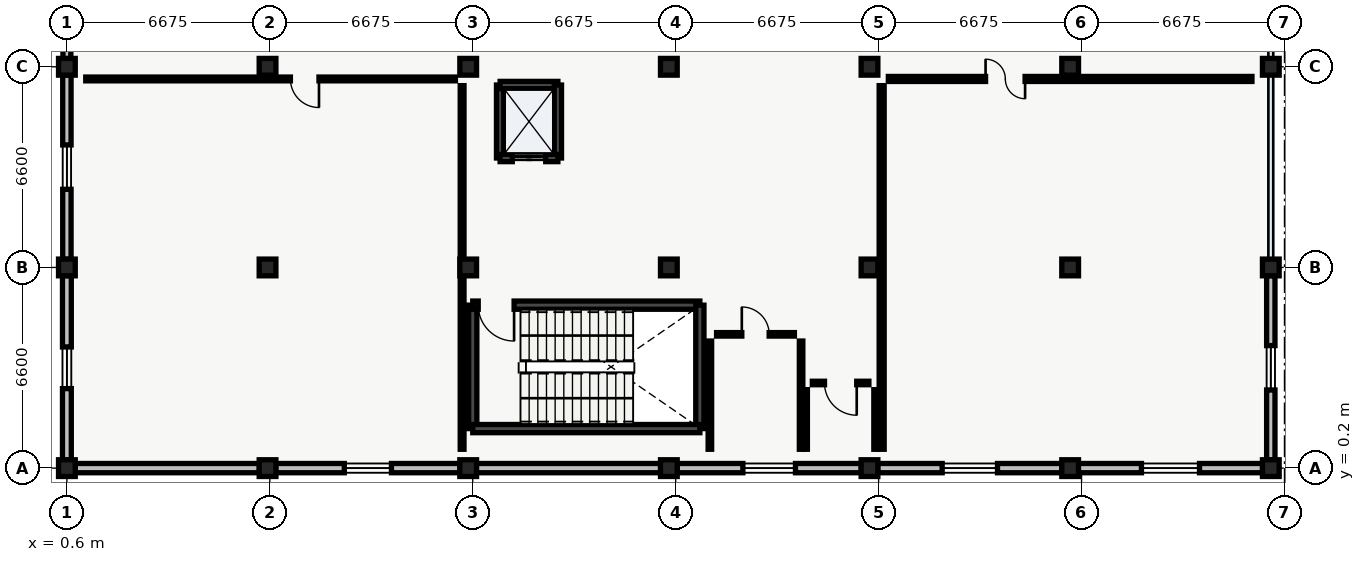
"""IFC4 building model, lengths in metres.
Left out: names, types, materials, properties, quantities, classifications, styles, units other than length and angle.
Written with IfcOpenShell. Run it as: python <this file> out.ifc"""

import sys

from ifc_helpers import new_model, si_unit, direction, frame, frame_2d, origin, origin_2d, place, context, subcontext, project, spatial, rectangle, extrude, element, fill, save


model = new_model("IFC4")
c1 = context("Model", 3, precision=1e-05, world=origin(), true_north=direction((0.0, 1.0)))
c2 = subcontext(c1, "Body", "Model", "MODEL_VIEW")
j1 = project(units=[si_unit("LENGTHUNIT", "METRE"), si_unit("PLANEANGLEUNIT", "RADIAN")], contexts=[c1])
p1 = place(None, origin())
s1 = spatial("IfcSite", under=j1, at=p1, CompositionType="ELEMENT")
p2 = place(p1, origin())
s2 = spatial("IfcBuilding", under=s1, at=p2, CompositionType="ELEMENT")
p3 = place(p2, frame((0.0, 0.0, 14.1)))
s3 = spatial("IfcBuildingStorey", under=s2, at=p3, CompositionType="ELEMENT", Elevation=14.1)
for number, where, z_axis, x_axis in (
    (1, (0.6, 0.2, 0.0), (0.0, 0.0, 1.0), (1.0, 0.0, 0.0)),
    (2, (0.6, 6.8, 0.0), (0.0, 0.0, 1.0), (1.0, 0.0, 0.0)),
    (3, (0.6, 13.4, 0.0), (0.0, 0.0, 1.0), (1.0, 0.0, 0.0)),
    (4, (7.2, 0.2, 0.0), (0.0, 0.0, 1.0), (1.0, 0.0, 0.0)),
    (5, (7.2, 6.8, 0.0), (0.0, 0.0, 1.0), (1.0, 0.0, 0.0)),
    (6, (7.2, 13.4, 0.0), (0.0, 0.0, 1.0), (1.0, 0.0, 0.0)),
    (7, (13.8, 0.2, 0.0), (0.0, 0.0, 1.0), (1.0, 0.0, 0.0)),
    (8, (13.8, 6.8, 0.0), (0.0, 0.0, 1.0), (1.0, 0.0, 0.0)),
    (9, (13.8, 13.4, 0.0), (0.0, 0.0, 1.0), (1.0, 0.0, 0.0)),
    (10, (20.4, 0.2, 0.0), (0.0, 0.0, 1.0), (1.0, 0.0, 0.0)),
    (11, (20.4, 6.8, 0.0), (0.0, 0.0, 1.0), (1.0, 0.0, 0.0)),
    (12, (20.4, 13.4, 0.0), (0.0, 0.0, 1.0), (1.0, 0.0, 0.0)),
    (13, (27.0, 0.2, 0.0), (0.0, 0.0, 1.0), (1.0, 0.0, 0.0)),
    (14, (27.0, 6.8, 0.0), (0.0, 0.0, 1.0), (1.0, 0.0, 0.0)),
    (15, (27.0, 13.4, 0.0), (0.0, 0.0, 1.0), (1.0, 0.0, 0.0)),
    (16, (33.6, 0.2, 0.0), (0.0, 0.0, 1.0), (1.0, 0.0, 0.0)),
    (17, (33.6, 6.8, 0.0), (0.0, 0.0, 1.0), (1.0, 0.0, 0.0)),
    (18, (33.6, 13.4, 0.0), (0.0, 0.0, 1.0), (1.0, 0.0, 0.0)),
    (19, (40.2, 0.2, 0.0), (0.0, 0.0, 1.0), (1.0, 0.0, 0.0)),
    (20, (40.2, 6.8, 0.0), (0.0, 0.0, 1.0), (1.0, 0.0, 0.0)),
    (21, (40.2, 13.4, 0.0), (0.0, 0.0, 1.0), (1.0, 0.0, 0.0)),
):
    element("IfcColumn", number, at=place(p3, frame(where, z_axis=z_axis, x_axis=x_axis)), inside=s3, PredefinedType="COLUMN", context=c2, shape_type="SweptSolid", body=[
        extrude(rectangle(XDim=0.55, YDim=0.55, at=origin_2d()), origin(), (0.0, 0.0, 1.0), 4.3),
    ])
p4 = place(p3, frame((0.6, 0.47, 0.0), z_axis=(0.0, 0.0, 1.0), x_axis=(0.0, 1.0, 0.0)))
e22 = element("IfcWall", 22, at=p4, inside=s3, PredefinedType="STANDARD", context=c2, shape_type="SweptSolid", body=[
    extrude(rectangle(XDim=6.06, YDim=0.29, at=frame_2d((3.03, 0.0))), origin(), (0.0, 0.0, 1.0), 3.785),
])
p5 = place(p4, frame((2.345, 0.0, 0.95)))
e23 = element("IfcOpeningElement", 23, at=p5, cuts=e22, PredefinedType="OPENING", context=c2, shape_type="SweptSolid", body=[
    extrude(rectangle(XDim=1.37, YDim=1.42, at=frame_2d((0.685, 0.71))), frame((0.0, 0.145, 0.0), z_axis=(0.0, -1.0, 0.0), x_axis=(1.0, 0.0, 0.0)), (0.0, 0.0, 1.0), 0.29),
])
p6 = place(p3, frame((0.6, 7.07, 0.0), z_axis=(0.0, 0.0, 1.0), x_axis=(0.0, 1.0, 0.0)))
e24 = element("IfcWall", 24, at=p6, inside=s3, PredefinedType="STANDARD", context=c2, shape_type="SweptSolid", body=[
    extrude(rectangle(XDim=6.06, YDim=0.275, at=frame_2d((3.03, 0.0))), origin(), (0.0, 0.0, 1.0), 3.785),
])
p7 = place(p6, frame((2.3, 0.0, 0.95)))
e25 = element("IfcOpeningElement", 25, at=p7, cuts=e24, PredefinedType="OPENING", context=c2, shape_type="SweptSolid", body=[
    extrude(rectangle(XDim=1.46, YDim=1.44, at=frame_2d((0.73, 0.72))), frame((0.0, 0.137, 0.0), z_axis=(0.0, -1.0, 0.0), x_axis=(1.0, 0.0, 0.0)), (0.0, 0.0, 1.0), 0.275),
])
p8 = place(p3, frame((0.6, 13.67, 0.0), z_axis=(0.0, 0.0, 1.0), x_axis=(0.0, 1.0, 0.0)))
e26 = element("IfcWall", 26, at=p8, inside=s3, PredefinedType="STANDARD", context=c2, shape_type="SweptSolid", body=[
    extrude(rectangle(XDim=6.06, YDim=0.26, at=frame_2d((3.03, 0.0))), origin(), (0.0, 0.0, 1.0), 3.785),
])
p9 = place(p8, frame((2.255, 0.0, 0.95)))
e27 = element("IfcOpeningElement", 27, at=p9, cuts=e26, PredefinedType="OPENING", context=c2, shape_type="SweptSolid", body=[
    extrude(rectangle(XDim=1.55, YDim=1.46, at=frame_2d((0.775, 0.73))), frame((0.0, 0.13, 0.0), z_axis=(0.0, -1.0, 0.0), x_axis=(1.0, 0.0, 0.0)), (0.0, 0.0, 1.0), 0.26),
])
p10 = place(p3, frame((40.2, 6.53, 0.0), z_axis=(0.0, 0.0, 1.0), x_axis=(0.0, -1.0, 0.0)))
e28 = element("IfcWall", 28, at=p10, inside=s3, PredefinedType="STANDARD", context=c2, shape_type="SweptSolid", body=[
    extrude(rectangle(XDim=6.06, YDim=0.275, at=frame_2d((3.03, 0.0))), origin(), (0.0, 0.0, 1.0), 3.785),
])
p11 = place(p10, frame((2.3, 0.0, 0.95)))
e29 = element("IfcOpeningElement", 29, at=p11, cuts=e28, PredefinedType="OPENING", context=c2, shape_type="SweptSolid", body=[
    extrude(rectangle(XDim=1.46, YDim=1.44, at=frame_2d((0.73, 0.72))), frame((0.0, 0.137, 0.0), z_axis=(0.0, -1.0, 0.0), x_axis=(1.0, 0.0, 0.0)), (0.0, 0.0, 1.0), 0.275),
])
p12 = place(p3, frame((39.93, 0.2, 0.0), z_axis=(0.0, 0.0, 1.0), x_axis=(-1.0, 0.0, 0.0)))
e30 = element("IfcWall", 30, at=p12, inside=s3, PredefinedType="STANDARD", context=c2, shape_type="SweptSolid", body=[
    extrude(rectangle(XDim=6.06, YDim=0.305, at=frame_2d((3.03, 0.0))), origin(), (0.0, 0.0, 1.0), 3.785),
])
p13 = place(p12, frame((2.075, 0.0, 0.95)))
e31 = element("IfcOpeningElement", 31, at=p13, cuts=e30, PredefinedType="OPENING", context=c2, shape_type="SweptSolid", body=[
    extrude(rectangle(XDim=1.91, YDim=1.4, at=frame_2d((0.955, 0.7))), frame((0.0, 0.152, 0.0), z_axis=(0.0, -1.0, 0.0), x_axis=(1.0, 0.0, 0.0)), (0.0, 0.0, 1.0), 0.305),
])
p14 = place(p3, frame((33.33, 0.2, 0.0), z_axis=(0.0, 0.0, 1.0), x_axis=(-1.0, 0.0, 0.0)))
e32 = element("IfcWall", 32, at=p14, inside=s3, PredefinedType="STANDARD", context=c2, shape_type="SweptSolid", body=[
    extrude(rectangle(XDim=6.06, YDim=0.305, at=frame_2d((3.03, 0.0))), origin(), (0.0, 0.0, 1.0), 3.785),
])
p15 = place(p14, frame((2.12, 0.0, 0.95)))
e33 = element("IfcOpeningElement", 33, at=p15, cuts=e32, PredefinedType="OPENING", context=c2, shape_type="SweptSolid", body=[
    extrude(rectangle(XDim=1.82, YDim=1.38, at=frame_2d((0.91, 0.69))), frame((0.0, 0.152, 0.0), z_axis=(0.0, -1.0, 0.0), x_axis=(1.0, 0.0, 0.0)), (0.0, 0.0, 1.0), 0.305),
])
p16 = place(p3, frame((26.73, 0.2, 0.0), z_axis=(0.0, 0.0, 1.0), x_axis=(-1.0, 0.0, 0.0)))
e34 = element("IfcWall", 34, at=p16, inside=s3, PredefinedType="STANDARD", context=c2, shape_type="SweptSolid", body=[
    extrude(rectangle(XDim=6.06, YDim=0.305, at=frame_2d((3.03, 0.0))), origin(), (0.0, 0.0, 1.0), 3.785),
])
p17 = place(p16, frame((2.165, 0.0, 0.95)))
e35 = element("IfcOpeningElement", 35, at=p17, cuts=e34, PredefinedType="OPENING", context=c2, shape_type="SweptSolid", body=[
    extrude(rectangle(XDim=1.73, YDim=1.36, at=frame_2d((0.865, 0.68))), frame((0.0, 0.152, 0.0), z_axis=(0.0, -1.0, 0.0), x_axis=(1.0, 0.0, 0.0)), (0.0, 0.0, 1.0), 0.305),
])
p18 = place(p3, frame((20.13, 0.2, 0.0), z_axis=(0.0, 0.0, 1.0), x_axis=(-1.0, 0.0, 0.0)))
e36 = element("IfcWall", 36, at=p18, inside=s3, PredefinedType="STANDARD", context=c2, shape_type="SweptSolid", body=[
    extrude(rectangle(XDim=6.06, YDim=0.305, at=frame_2d((3.03, 0.0))), origin(), (0.0, 0.0, 1.0), 3.785),
])
p19 = place(p3, frame((13.53, 0.2, 0.0), z_axis=(0.0, 0.0, 1.0), x_axis=(-1.0, 0.0, 0.0)))
e37 = element("IfcWall", 37, at=p19, inside=s3, PredefinedType="STANDARD", context=c2, shape_type="SweptSolid", body=[
    extrude(rectangle(XDim=6.06, YDim=0.305, at=frame_2d((3.03, 0.0))), origin(), (0.0, 0.0, 1.0), 3.785),
])
p20 = place(p19, frame((2.255, 0.0, 0.95)))
e38 = element("IfcOpeningElement", 38, at=p20, cuts=e37, PredefinedType="OPENING", context=c2, shape_type="SweptSolid", body=[
    extrude(rectangle(XDim=1.55, YDim=1.46, at=frame_2d((0.775, 0.73))), frame((0.0, 0.152, 0.0), z_axis=(0.0, -1.0, 0.0), x_axis=(1.0, 0.0, 0.0)), (0.0, 0.0, 1.0), 0.305),
])
p21 = place(p3, frame((6.93, 0.2, 0.0), z_axis=(0.0, 0.0, 1.0), x_axis=(-1.0, 0.0, 0.0)))
e39 = element("IfcWall", 39, at=p21, inside=s3, PredefinedType="STANDARD", context=c2, shape_type="SweptSolid", body=[
    extrude(rectangle(XDim=6.06, YDim=0.305, at=frame_2d((3.03, 0.0))), origin(), (0.0, 0.0, 1.0), 3.785),
])
p22 = place(p3, frame((13.95, 1.5, 0.0), z_axis=(0.0, 0.0, 1.0), x_axis=(0.0, 1.0, 0.0)))
e40 = element("IfcWall", 40, at=p22, inside=s3, PredefinedType="SHEAR", context=c2, shape_type="SweptSolid", body=[
    extrude(rectangle(XDim=4.06, YDim=0.27, at=frame_2d((2.03, 0.0))), origin(), (0.0, 0.0, 1.0), 4.28),
])
p23 = place(p3, frame((13.95, 5.56, 0.0), z_axis=(0.0, 0.0, 1.0), x_axis=(1.0, 0.0, 0.0)))
e41 = element("IfcWall", 41, at=p23, inside=s3, PredefinedType="SHEAR", context=c2, shape_type="SweptSolid", body=[
    extrude(rectangle(XDim=7.47, YDim=0.27, at=frame_2d((3.735, 0.0))), origin(), (0.0, 0.0, 1.0), 4.28),
])
p24 = place(p23, frame((0.18, 0.0, 0.0)))
e42 = element("IfcOpeningElement", 42, at=p24, cuts=e41, PredefinedType="OPENING", context=c2, shape_type="SweptSolid", body=[
    extrude(rectangle(XDim=1.18, YDim=2.15, at=frame_2d((0.59, 1.075))), frame((0.0, 0.135, 0.0), z_axis=(0.0, -1.0, 0.0), x_axis=(1.0, 0.0, 0.0)), (0.0, 0.0, 1.0), 0.27),
])
p25 = place(p3, frame((21.42, 5.56, 0.0), z_axis=(0.0, 0.0, 1.0), x_axis=(0.0, -1.0, 0.0)))
e43 = element("IfcWall", 43, at=p25, inside=s3, PredefinedType="SHEAR", context=c2, shape_type="SweptSolid", body=[
    extrude(rectangle(XDim=4.06, YDim=0.27, at=frame_2d((2.03, 0.0))), origin(), (0.0, 0.0, 1.0), 4.28),
])
p26 = place(p3, frame((21.42, 1.5, 0.0), z_axis=(0.0, 0.0, 1.0), x_axis=(-1.0, 0.0, 0.0)))
e44 = element("IfcWall", 44, at=p26, inside=s3, PredefinedType="SHEAR", context=c2, shape_type="SweptSolid", body=[
    extrude(rectangle(XDim=7.47, YDim=0.27, at=frame_2d((3.735, 0.0))), origin(), (0.0, 0.0, 1.0), 4.28),
])
p27 = place(p3, frame((14.85, 10.4, 0.0), z_axis=(0.0, 0.0, 1.0), x_axis=(0.0, 1.0, 0.0)))
e45 = element("IfcWall", 45, at=p27, inside=s3, PredefinedType="SHEAR", context=c2, shape_type="SweptSolid", body=[
    extrude(rectangle(XDim=2.4, YDim=0.24, at=frame_2d((1.2, 0.0))), origin(), (0.0, 0.0, 1.0), 4.28),
])
p28 = place(p3, frame((14.85, 12.8, 0.0), z_axis=(0.0, 0.0, 1.0), x_axis=(1.0, 0.0, 0.0)))
e46 = element("IfcWall", 46, at=p28, inside=s3, PredefinedType="SHEAR", context=c2, shape_type="SweptSolid", body=[
    extrude(rectangle(XDim=1.9, YDim=0.24, at=frame_2d((0.95, 0.0))), origin(), (0.0, 0.0, 1.0), 4.28),
])
p29 = place(p3, frame((16.75, 12.8, 0.0), z_axis=(0.0, 0.0, 1.0), x_axis=(0.0, -1.0, 0.0)))
e47 = element("IfcWall", 47, at=p29, inside=s3, PredefinedType="SHEAR", context=c2, shape_type="SweptSolid", body=[
    extrude(rectangle(XDim=2.4, YDim=0.24, at=frame_2d((1.2, 0.0))), origin(), (0.0, 0.0, 1.0), 4.28),
])
p30 = place(p3, frame((16.75, 10.4, 0.0), z_axis=(0.0, 0.0, 1.0), x_axis=(-1.0, 0.0, 0.0)))
e48 = element("IfcWall", 48, at=p30, inside=s3, PredefinedType="SHEAR", context=c2, shape_type="SweptSolid", body=[
    extrude(rectangle(XDim=1.9, YDim=0.24, at=frame_2d((0.95, 0.0))), origin(), (0.0, 0.0, 1.0), 4.28),
])
p31 = place(p30, frame((0.4, 0.0, 0.0)))
e49 = element("IfcOpeningElement", 49, at=p31, cuts=e48, PredefinedType="OPENING", context=c2, shape_type="SweptSolid", body=[
    extrude(rectangle(XDim=1.1, YDim=2.2, at=frame_2d((0.55, 1.1))), frame((0.0, 0.12, 0.0), z_axis=(0.0, -1.0, 0.0), x_axis=(1.0, 0.0, 0.0)), (0.0, 0.0, 1.0), 0.24),
])
p32 = place(p3, frame((24.75, 0.82, 0.0), z_axis=(0.0, 0.0, 1.0), x_axis=(0.0, 1.0, 0.0)))
e50 = element("IfcWall", 50, at=p32, inside=s3, PredefinedType="PARTITIONING", context=c2, shape_type="SweptSolid", body=[
    extrude(rectangle(XDim=3.56, YDim=0.115, at=frame_2d((1.78, 0.0))), origin(), (0.0, 0.0, 1.0), 3.95),
])
p33 = place(p3, frame((24.53, 4.6, 0.0), z_axis=(0.0, 0.0, 1.0), x_axis=(-1.0, 0.0, 0.0)))
e51 = element("IfcWall", 51, at=p33, inside=s3, PredefinedType="PARTITIONING", context=c2, shape_type="SweptSolid", body=[
    extrude(rectangle(XDim=2.56, YDim=0.115, at=frame_2d((1.28, 0.0))), origin(), (0.0, 0.0, 1.0), 3.95),
])
p34 = place(p33, frame((0.83, 0.0, 0.0)))
e52 = element("IfcOpeningElement", 52, at=p34, cuts=e51, PredefinedType="OPENING", context=c2, shape_type="SweptSolid", body=[
    extrude(rectangle(XDim=0.9, YDim=2.1, at=frame_2d((0.45, 1.05))), frame((0.0, 0.058, 0.0), z_axis=(0.0, -1.0, 0.0), x_axis=(1.0, 0.0, 0.0)), (0.0, 0.0, 1.0), 0.115),
])
p35 = place(p3, frame((21.75, 4.38, 0.0), z_axis=(0.0, 0.0, 1.0), x_axis=(0.0, -1.0, 0.0)))
e53 = element("IfcWall", 53, at=p35, inside=s3, PredefinedType="PARTITIONING", context=c2, shape_type="SweptSolid", body=[
    extrude(rectangle(XDim=3.56, YDim=0.115, at=frame_2d((1.78, 0.0))), origin(), (0.0, 0.0, 1.0), 3.95),
])
p36 = place(p3, frame((27.2, 0.82, 0.0), z_axis=(0.0, 0.0, 1.0), x_axis=(0.0, 1.0, 0.0)))
e54 = element("IfcWall", 54, at=p36, inside=s3, PredefinedType="PARTITIONING", context=c2, shape_type="SweptSolid", body=[
    extrude(rectangle(XDim=1.96, YDim=0.115, at=frame_2d((0.98, 0.0))), origin(), (0.0, 0.0, 1.0), 3.685),
])
p37 = place(p3, frame((26.98, 3.0, 0.0), z_axis=(0.0, 0.0, 1.0), x_axis=(-1.0, 0.0, 0.0)))
e55 = element("IfcWall", 55, at=p37, inside=s3, PredefinedType="PARTITIONING", context=c2, shape_type="SweptSolid", body=[
    extrude(rectangle(XDim=1.86, YDim=0.115, at=frame_2d((0.93, 0.0))), origin(), (0.0, 0.0, 1.0), 3.95),
])
p38 = place(p37, frame((0.4, 0.0, 0.0)))
e56 = element("IfcOpeningElement", 56, at=p38, cuts=e55, PredefinedType="OPENING", context=c2, shape_type="SweptSolid", body=[
    extrude(rectangle(XDim=1.06, YDim=2.12, at=frame_2d((0.53, 1.06))), frame((0.0, 0.058, 0.0), z_axis=(0.0, -1.0, 0.0), x_axis=(1.0, 0.0, 0.0)), (0.0, 0.0, 1.0), 0.115),
])
p39 = place(p3, frame((24.9, 2.78, 0.0), z_axis=(0.0, 0.0, 1.0), x_axis=(0.0, -1.0, 0.0)))
e57 = element("IfcWall", 57, at=p39, inside=s3, PredefinedType="PARTITIONING", context=c2, shape_type="SweptSolid", body=[
    extrude(rectangle(XDim=1.96, YDim=0.115, at=frame_2d((0.98, 0.0))), origin(), (0.0, 0.0, 1.0), 3.95),
])
p40 = place(p3, frame((13.6, 0.82, 0.0), z_axis=(0.0, 0.0, 1.0), x_axis=(0.0, 1.0, 0.0)))
e58 = element("IfcWall", 58, at=p40, inside=s3, PredefinedType="PARTITIONING", context=c2, shape_type="SweptSolid", body=[
    extrude(rectangle(XDim=11.96, YDim=0.125, at=frame_2d((5.98, 0.0))), origin(), (0.0, 0.0, 1.0), 3.685),
])
p41 = place(p3, frame((13.38, 13.0, 0.0), z_axis=(0.0, 0.0, 1.0), x_axis=(-1.0, 0.0, 0.0)))
e59 = element("IfcWall", 59, at=p41, inside=s3, PredefinedType="PARTITIONING", context=c2, shape_type="SweptSolid", body=[
    extrude(rectangle(XDim=12.16, YDim=0.125, at=frame_2d((6.08, 0.0))), origin(), (0.0, 0.0, 1.0), 3.95),
])
p42 = place(p41, frame((4.488, 0.0, 0.0)))
e60 = element("IfcOpeningElement", 60, at=p42, cuts=e59, PredefinedType="OPENING", context=c2, shape_type="SweptSolid", body=[
    extrude(rectangle(XDim=0.94, YDim=2.12, at=frame_2d((0.47, 1.06))), frame((0.0, 0.062, 0.0), z_axis=(0.0, -1.0, 0.0), x_axis=(1.0, 0.0, 0.0)), (0.0, 0.0, 1.0), 0.125),
])
p43 = place(p3, frame((39.58, 13.0, 0.0), z_axis=(0.0, 0.0, 1.0), x_axis=(-1.0, 0.0, 0.0)))
e61 = element("IfcWall", 61, at=p43, inside=s3, PredefinedType="PARTITIONING", context=c2, shape_type="SweptSolid", body=[
    extrude(rectangle(XDim=11.96, YDim=0.165, at=frame_2d((5.98, 0.0))), origin(), (0.0, 0.0, 1.0), 3.95),
])
p44 = place(p43, frame((7.462, 0.0, 0.0)))
e62 = element("IfcOpeningElement", 62, at=p44, cuts=e61, PredefinedType="OPENING", context=c2, shape_type="SweptSolid", body=[
    extrude(rectangle(XDim=1.3, YDim=2.18, at=frame_2d((0.65, 1.09))), frame((0.0, 0.083, 0.0), z_axis=(0.0, -1.0, 0.0), x_axis=(1.0, 0.0, 0.0)), (0.0, 0.0, 1.0), 0.165),
])
p45 = place(p3, frame((27.4, 12.78, 0.0), z_axis=(0.0, 0.0, 1.0), x_axis=(0.0, -1.0, 0.0)))
e63 = element("IfcWall", 63, at=p45, inside=s3, PredefinedType="PARTITIONING", context=c2, shape_type="SweptSolid", body=[
    extrude(rectangle(XDim=11.96, YDim=0.165, at=frame_2d((5.98, 0.0))), origin(), (0.0, 0.0, 1.0), 3.95),
])
p46 = place(p5, origin())
e64 = element("IfcWindow", 64, at=p46, inside=s3, PartitioningType="SINGLE_PANEL", PredefinedType="WINDOW", context=c2, shape_type="SweptSolid", body=[
    extrude(rectangle(XDim=1.37, YDim=1.42, at=frame_2d((0.685, 0.71))), frame((0.0, 0.03, 0.0), z_axis=(0.0, -1.0, 0.0), x_axis=(1.0, 0.0, 0.0)), (0.0, 0.0, 1.0), 0.06),
])
fill(e23, e64)
p47 = place(p7, origin())
e65 = element("IfcWindow", 65, at=p47, inside=s3, PartitioningType="SINGLE_PANEL", PredefinedType="WINDOW", context=c2, shape_type="SweptSolid", body=[
    extrude(rectangle(XDim=1.46, YDim=1.44, at=frame_2d((0.73, 0.72))), frame((0.0, 0.03, 0.0), z_axis=(0.0, -1.0, 0.0), x_axis=(1.0, 0.0, 0.0)), (0.0, 0.0, 1.0), 0.06),
])
fill(e25, e65)
p48 = place(p11, origin())
e66 = element("IfcWindow", 66, at=p48, inside=s3, PartitioningType="SINGLE_PANEL", PredefinedType="WINDOW", context=c2, shape_type="SweptSolid", body=[
    extrude(rectangle(XDim=1.46, YDim=1.44, at=frame_2d((0.73, 0.72))), frame((0.0, 0.03, 0.0), z_axis=(0.0, -1.0, 0.0), x_axis=(1.0, 0.0, 0.0)), (0.0, 0.0, 1.0), 0.06),
])
fill(e29, e66)
p49 = place(p13, origin())
e67 = element("IfcWindow", 67, at=p49, inside=s3, PartitioningType="SINGLE_PANEL", PredefinedType="WINDOW", context=c2, shape_type="SweptSolid", body=[
    extrude(rectangle(XDim=1.91, YDim=1.4, at=frame_2d((0.955, 0.7))), frame((0.0, 0.03, 0.0), z_axis=(0.0, -1.0, 0.0), x_axis=(1.0, 0.0, 0.0)), (0.0, 0.0, 1.0), 0.06),
])
fill(e31, e67)
p50 = place(p15, origin())
e68 = element("IfcWindow", 68, at=p50, inside=s3, PartitioningType="SINGLE_PANEL", PredefinedType="WINDOW", context=c2, shape_type="SweptSolid", body=[
    extrude(rectangle(XDim=1.82, YDim=1.38, at=frame_2d((0.91, 0.69))), frame((0.0, 0.03, 0.0), z_axis=(0.0, -1.0, 0.0), x_axis=(1.0, 0.0, 0.0)), (0.0, 0.0, 1.0), 0.06),
])
fill(e33, e68)
p51 = place(p17, origin())
e69 = element("IfcWindow", 69, at=p51, inside=s3, PartitioningType="SINGLE_PANEL", PredefinedType="WINDOW", context=c2, shape_type="SweptSolid", body=[
    extrude(rectangle(XDim=1.73, YDim=1.36, at=frame_2d((0.865, 0.68))), frame((0.0, 0.03, 0.0), z_axis=(0.0, -1.0, 0.0), x_axis=(1.0, 0.0, 0.0)), (0.0, 0.0, 1.0), 0.06),
])
fill(e35, e69)
p52 = place(p20, origin())
e70 = element("IfcWindow", 70, at=p52, inside=s3, PartitioningType="SINGLE_PANEL", PredefinedType="WINDOW", context=c2, shape_type="SweptSolid", body=[
    extrude(rectangle(XDim=1.55, YDim=1.46, at=frame_2d((0.775, 0.73))), frame((0.0, 0.03, 0.0), z_axis=(0.0, -1.0, 0.0), x_axis=(1.0, 0.0, 0.0)), (0.0, 0.0, 1.0), 0.06),
])
fill(e38, e70)
p53 = place(p24, origin())
e71 = element("IfcDoor", 71, at=p53, inside=s3, OperationType="SINGLE_SWING_RIGHT", PredefinedType="DOOR", context=c2, shape_type="SweptSolid", body=[
    extrude(rectangle(XDim=1.18, YDim=2.15, at=frame_2d((0.59, 1.075))), frame((0.0, 0.025, 0.0), z_axis=(0.0, -1.0, 0.0), x_axis=(1.0, 0.0, 0.0)), (0.0, 0.0, 1.0), 0.05),
])
fill(e42, e71)
p54 = place(p31, origin())
e72 = element("IfcDoor", 72, at=p54, inside=s3, OperationType="SLIDING_TO_LEFT", PredefinedType="DOOR", context=c2, shape_type="SweptSolid", body=[
    extrude(rectangle(XDim=1.1, YDim=2.2, at=frame_2d((0.55, 1.1))), frame((0.0, 0.025, 0.0), z_axis=(0.0, -1.0, 0.0), x_axis=(1.0, 0.0, 0.0)), (0.0, 0.0, 1.0), 0.05),
])
fill(e49, e72)
p55 = place(p34, origin())
e73 = element("IfcDoor", 73, at=p55, inside=s3, OperationType="SINGLE_SWING_RIGHT", PredefinedType="DOOR", context=c2, shape_type="SweptSolid", body=[
    extrude(rectangle(XDim=0.9, YDim=2.1, at=frame_2d((0.45, 1.05))), frame((0.0, 0.025, 0.0), z_axis=(0.0, -1.0, 0.0), x_axis=(1.0, 0.0, 0.0)), (0.0, 0.0, 1.0), 0.05),
])
fill(e52, e73)
p56 = place(p38, origin())
e74 = element("IfcDoor", 74, at=p56, inside=s3, OperationType="SINGLE_SWING_LEFT", PredefinedType="DOOR", context=c2, shape_type="SweptSolid", body=[
    extrude(rectangle(XDim=1.06, YDim=2.12, at=frame_2d((0.53, 1.06))), frame((0.0, 0.025, 0.0), z_axis=(0.0, -1.0, 0.0), x_axis=(1.0, 0.0, 0.0)), (0.0, 0.0, 1.0), 0.05),
])
fill(e56, e74)
p57 = place(p42, origin())
e75 = element("IfcDoor", 75, at=p57, inside=s3, OperationType="SINGLE_SWING_LEFT", PredefinedType="DOOR", context=c2, shape_type="SweptSolid", body=[
    extrude(rectangle(XDim=0.94, YDim=2.12, at=frame_2d((0.47, 1.06))), frame((0.0, 0.025, 0.0), z_axis=(0.0, -1.0, 0.0), x_axis=(1.0, 0.0, 0.0)), (0.0, 0.0, 1.0), 0.05),
])
fill(e60, e75)
p58 = place(p44, origin())
e76 = element("IfcDoor", 76, at=p58, inside=s3, OperationType="DOUBLE_DOOR_SINGLE_SWING", PredefinedType="DOOR", context=c2, shape_type="SweptSolid", body=[
    extrude(rectangle(XDim=1.3, YDim=2.18, at=frame_2d((0.65, 1.09))), frame((0.0, 0.025, 0.0), z_axis=(0.0, -1.0, 0.0), x_axis=(1.0, 0.0, 0.0)), (0.0, 0.0, 1.0), 0.05),
])
fill(e62, e76)
save(model, sys.argv[1])
